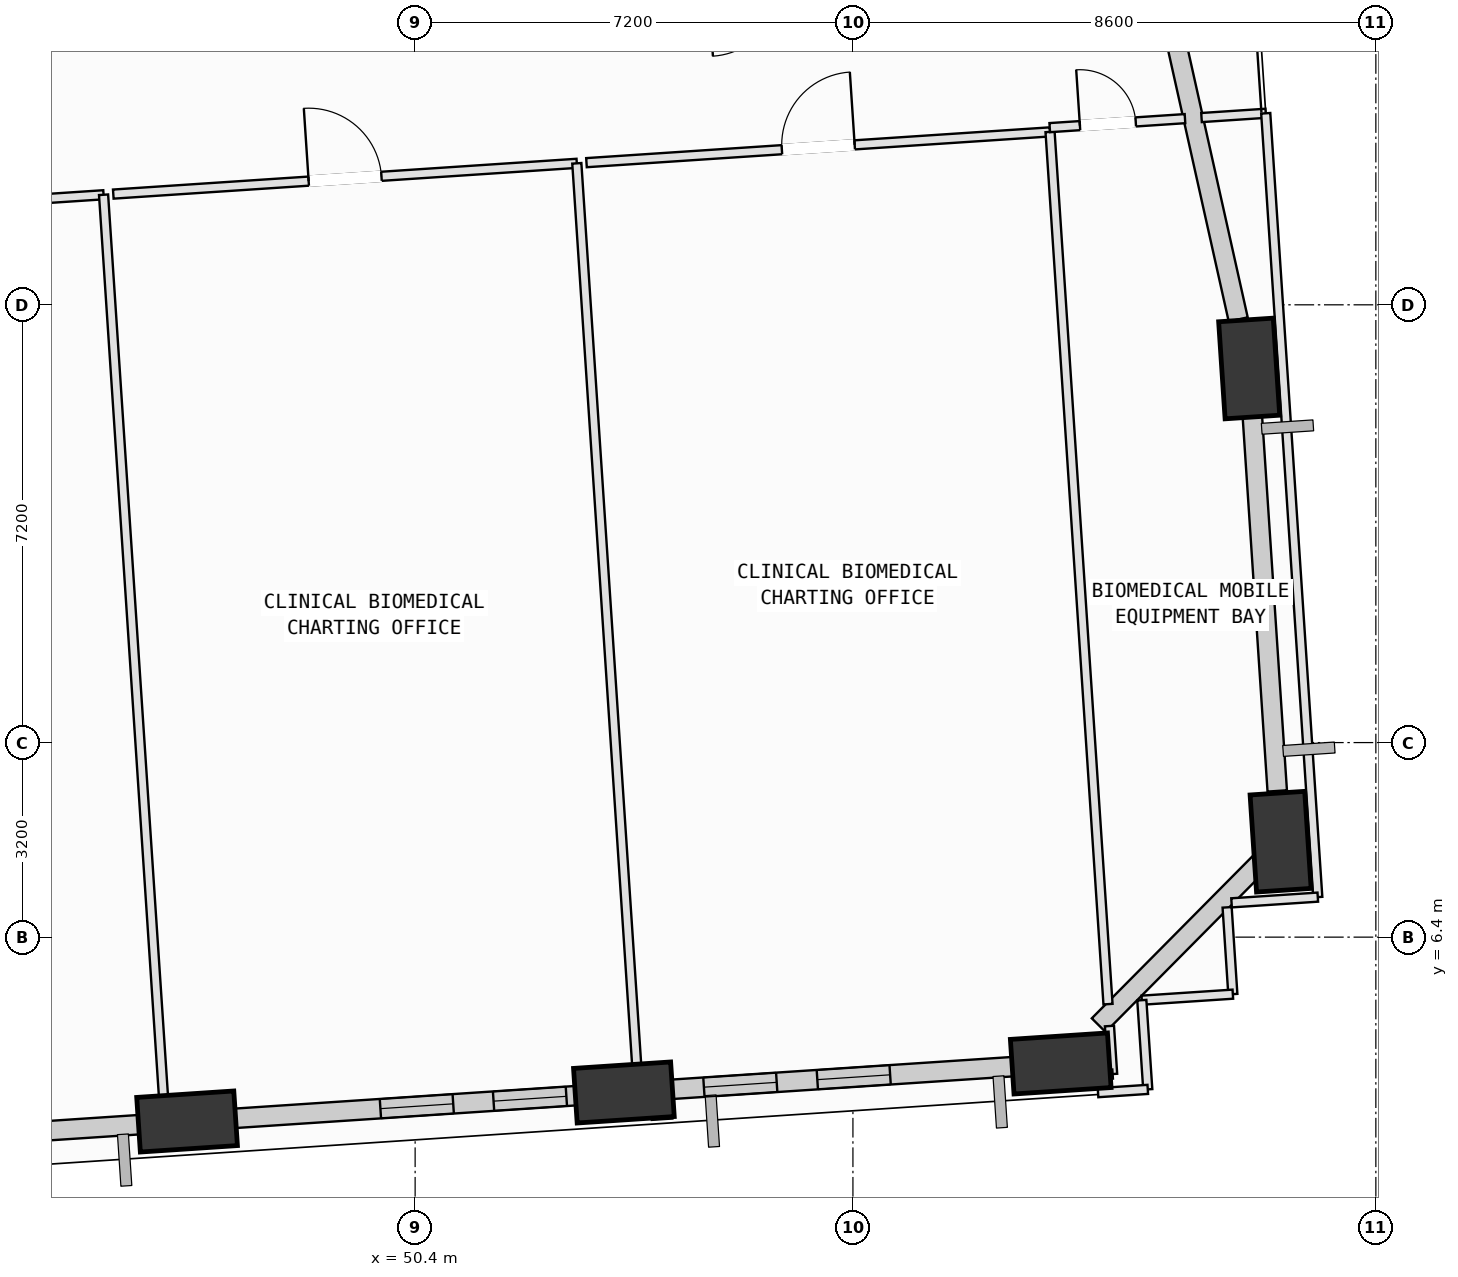
"""IFC4 building model, lengths in metres.
Left out: names, types, materials, properties, quantities, classifications, styles, units other than length and angle.
Written with IfcOpenShell. Run it as: python <this file> out.ifc"""

import sys

from ifc_helpers import new_model, si_unit, direction, frame, frame_2d, origin, origin_2d, place, context, subcontext, project, spatial, rectangle, extrude, element, fill, save


model = new_model("IFC4")
c1 = context("Model", 3, precision=1e-05, world=origin(), true_north=direction((0.0, 1.0)))
c2 = subcontext(c1, "Body", "Model", "MODEL_VIEW")
j1 = project(units=[si_unit("LENGTHUNIT", "METRE"), si_unit("PLANEANGLEUNIT", "RADIAN")], contexts=[c1])
p1 = place(None, origin())
s1 = spatial("IfcSite", under=j1, at=p1, CompositionType="ELEMENT")
p2 = place(p1, origin())
s2 = spatial("IfcBuilding", under=s1, at=p2, CompositionType="ELEMENT")
p3 = place(p2, frame((0.0, 0.0, 39.0)))
s3 = spatial("IfcBuildingStorey", under=s2, at=p3, CompositionType="ELEMENT", Elevation=39.0)
p4 = place(p3, frame((46.649, 3.368, 0.002), z_axis=(0.087918926178, 0.054561987359, 0.994632219444), x_axis=(-0.582154202885, 0.813049480392, 0.006857586938)))
e1 = element("IfcColumn", 1, at=p4, inside=s3, PredefinedType="COLUMN", context=c2, shape_type="SweptSolid", body=[
    extrude(rectangle(XDim=1.6, YDim=0.9, at=origin_2d()), origin(), (0.0, 0.0, 1.0), 4.018),
])
p5 = place(p3, frame((53.833, 3.845, 0.002), z_axis=(0.085512165831, 0.083995992678, 0.992790180607), x_axis=(-0.746152490945, 0.665727687724, 0.007943931871)))
e2 = element("IfcColumn", 2, at=p5, inside=s3, PredefinedType="COLUMN", context=c2, shape_type="SweptSolid", body=[
    extrude(rectangle(XDim=1.6, YDim=0.9, at=origin_2d()), origin(), (0.0, 0.0, 1.0), 4.026),
])
p6 = place(p3, frame((61.018, 4.322, 0.002), z_axis=(0.083102095213, 0.113222068587, 0.990088281395), x_axis=(-0.843211688946, 0.537501079101, 0.009307931615)))
e3 = element("IfcColumn", 3, at=p6, inside=s3, PredefinedType="COLUMN", context=c2, shape_type="SweptSolid", body=[
    extrude(rectangle(XDim=1.6, YDim=0.9, at=origin_2d()), origin(), (0.0, 0.0, 1.0), 4.037),
])
p7 = place(p3, frame((64.634, 7.97, 0.002), z_axis=(0.067938851582, 0.127838675352, 0.989465302843), x_axis=(-0.404799961603, -0.902923380354, 0.144451930745)))
e4 = element("IfcColumn", 4, at=p7, inside=s3, PredefinedType="COLUMN", context=c2, shape_type="SweptSolid", body=[
    extrude(rectangle(XDim=1.6, YDim=0.9, at=origin_2d()), origin(), (0.0, 0.0, 1.0), 4.039),
])
p8 = place(p3, frame((64.117, 15.753, 0.002), z_axis=(0.036155726084, 0.125727449498, 0.991405755437), x_axis=(-0.209701379311, -0.969012835214, 0.130535269967)))
e5 = element("IfcColumn", 5, at=p8, inside=s3, PredefinedType="COLUMN", context=c2, shape_type="SweptSolid", body=[
    extrude(rectangle(XDim=1.6, YDim=0.9, at=origin_2d()), origin(), (0.0, 0.0, 1.0), 4.031),
])
p9 = place(p3, frame((46.234, 3.34, 0.0), z_axis=(0.0, 0.0, 1.0), x_axis=(-0.997800992152, -0.066281068641, 0.0)))
e6 = element("IfcWall", 6, at=p9, inside=s3, PredefinedType="SOLIDWALL", context=c2, shape_type="SweptSolid", body=[
    extrude(rectangle(XDim=5.993, YDim=0.32, at=frame_2d((2.997, 0.0))), origin(), (0.0, 0.0, 1.0), 3.145),
])
p10 = place(p9, frame((2.298, 0.0, 0.75)))
e7 = element("IfcOpeningElement", 7, at=p10, cuts=e6, PredefinedType="OPENING", context=c2, shape_type="SweptSolid", body=[
    extrude(rectangle(XDim=1.4, YDim=1.85, at=frame_2d((0.7, 0.925))), frame((0.0, 0.17, 0.0), z_axis=(0.0, -1.0, 0.0), x_axis=(1.0, 0.0, 0.0)), (0.0, 0.0, 1.0), 0.34),
])
p11 = place(p3, frame((53.43, 3.818, 0.0), z_axis=(0.0, 0.0, 1.0), x_axis=(-0.997801835768, -0.066268367557, 0.0)))
e8 = element("IfcWall", 8, at=p11, inside=s3, PredefinedType="SOLIDWALL", context=c2, shape_type="SweptSolid", body=[
    extrude(rectangle(XDim=6.012, YDim=0.32, at=frame_2d((3.006, 0.0))), origin(), (0.0, 0.0, 1.0), 2.865),
])
p12 = place(p11, frame((2.409, 0.0, 0.75)))
e9 = element("IfcOpeningElement", 9, at=p12, cuts=e8, PredefinedType="OPENING", context=c2, shape_type="SweptSolid", body=[
    extrude(rectangle(XDim=1.2, YDim=1.75, at=frame_2d((0.6, 0.875))), frame((0.0, 0.17, 0.0), z_axis=(0.0, -1.0, 0.0), x_axis=(1.0, 0.0, 0.0)), (0.0, 0.0, 1.0), 0.34),
])
p13 = place(p11, frame((0.544, 0.0, 0.75)))
e10 = element("IfcOpeningElement", 10, at=p13, cuts=e8, PredefinedType="OPENING", context=c2, shape_type="SweptSolid", body=[
    extrude(rectangle(XDim=1.2, YDim=1.75, at=frame_2d((0.6, 0.875))), frame((0.0, 0.17, 0.0), z_axis=(0.0, -1.0, 0.0), x_axis=(1.0, 0.0, 0.0)), (0.0, 0.0, 1.0), 0.34),
])
p14 = place(p3, frame((60.633, 4.296, 0.0), z_axis=(0.0, 0.0, 1.0), x_axis=(-0.997803705624, -0.066240207142, 0.0)))
e11 = element("IfcWall", 11, at=p14, inside=s3, PredefinedType="SOLIDWALL", context=c2, shape_type="SweptSolid", body=[
    extrude(rectangle(XDim=6.044, YDim=0.32, at=frame_2d((3.022, 0.0))), origin(), (0.0, 0.0, 1.0), 2.865),
])
p15 = place(p14, frame((2.427, 0.0, 0.75)))
e12 = element("IfcOpeningElement", 12, at=p15, cuts=e11, PredefinedType="OPENING", context=c2, shape_type="SweptSolid", body=[
    extrude(rectangle(XDim=1.2, YDim=1.75, at=frame_2d((0.6, 0.875))), frame((0.0, 0.17, 0.0), z_axis=(0.0, -1.0, 0.0), x_axis=(1.0, 0.0, 0.0)), (0.0, 0.0, 1.0), 0.34),
])
p16 = place(p14, frame((4.296, 0.0, 0.75)))
e13 = element("IfcOpeningElement", 13, at=p16, cuts=e11, PredefinedType="OPENING", context=c2, shape_type="SweptSolid", body=[
    extrude(rectangle(XDim=1.2, YDim=1.75, at=frame_2d((0.6, 0.875))), frame((0.0, 0.17, 0.0), z_axis=(0.0, -1.0, 0.0), x_axis=(1.0, 0.0, 0.0)), (0.0, 0.0, 1.0), 0.34),
])
p17 = place(p3, frame((64.407, 7.741, 0.0), z_axis=(0.0, 0.0, 1.0), x_axis=(-0.704023171007, -0.710177002363, 0.0)))
e14 = element("IfcWall", 14, at=p17, inside=s3, PredefinedType="SOLIDWALL", context=c2, shape_type="SweptSolid", body=[
    extrude(rectangle(XDim=3.928, YDim=0.32, at=frame_2d((1.964, 0.0))), origin(), (0.0, 0.0, 1.0), 3.165),
])
p18 = place(p3, frame((64.14, 15.4, 0.0), z_axis=(0.0, 0.0, 1.0), x_axis=(0.066259164562, -0.997802446936, 0.0)))
e15 = element("IfcWall", 15, at=p18, inside=s3, PredefinedType="SOLIDWALL", context=c2, shape_type="SweptSolid", body=[
    extrude(rectangle(XDim=6.61, YDim=0.32, at=frame_2d((3.305, 0.0))), origin(), (0.0, 0.0, 1.0), 3.165),
])
p19 = place(p3, frame((62.059, 24.966, 0.0), z_axis=(0.0, 0.0, 1.0), x_axis=(0.217983679512, -0.97595241455, 0.0)))
e16 = element("IfcWall", 16, at=p19, inside=s3, PredefinedType="SOLIDWALL", context=c2, shape_type="SweptSolid", body=[
    extrude(rectangle(XDim=8.614, YDim=0.32, at=frame_2d((4.307, 0.0))), origin(), (0.0, 0.0, 1.0), 3.165),
])
p20 = place(p3, frame((38.03, 18.129, 0.0), z_axis=(0.0, 0.0, 1.0), x_axis=(0.997802084091, 0.066264628449, 0.0)))
e17 = element("IfcWall", 17, at=p20, inside=s3, PredefinedType="PARTITIONING", context=c2, shape_type="SweptSolid", body=[
    extrude(rectangle(XDim=7.262, YDim=0.15, at=frame_2d((3.631, 0.0))), origin(), (0.0, 0.0, 1.0), 3.78),
])
p21 = place(p20, frame((3.031, 0.0, 0.0)))
e18 = element("IfcOpeningElement", 18, at=p21, cuts=e17, PredefinedType="OPENING", context=c2, shape_type="SweptSolid", body=[
    extrude(rectangle(XDim=1.2, YDim=2.15, at=frame_2d((0.6, 1.075))), frame((0.0, 0.085, 0.0), z_axis=(0.0, -1.0, 0.0), x_axis=(1.0, 0.0, 0.0)), (0.0, 0.0, 1.0), 0.17),
])
p22 = place(p3, frame((45.276, 18.61, 0.0), z_axis=(0.0, 0.0, 1.0), x_axis=(0.066289466221, -0.997800434289, 0.0)))
e19 = element("IfcWall", 19, at=p22, inside=s3, PredefinedType="PARTITIONING", context=c2, shape_type="SweptSolid", body=[
    extrude(rectangle(XDim=15.177, YDim=0.15, at=frame_2d((7.589, 0.0))), origin(), (0.0, 0.0, 1.0), 3.78),
])
p23 = place(p3, frame((45.436, 18.621, 0.0), z_axis=(0.0, 0.0, 1.0), x_axis=(0.997805472688, 0.066213583763, 0.0)))
e20 = element("IfcWall", 20, at=p23, inside=s3, PredefinedType="PARTITIONING", context=c2, shape_type="SweptSolid", body=[
    extrude(rectangle(XDim=7.64, YDim=0.15, at=frame_2d((3.82, 0.0))), origin(), (0.0, 0.0, 1.0), 3.78),
])
p24 = place(p23, frame((3.22, 0.0, 0.0)))
e21 = element("IfcOpeningElement", 21, at=p24, cuts=e20, PredefinedType="OPENING", context=c2, shape_type="SweptSolid", body=[
    extrude(rectangle(XDim=1.2, YDim=2.15, at=frame_2d((0.6, 1.075))), frame((0.0, 0.085, 0.0), z_axis=(0.0, -1.0, 0.0), x_axis=(1.0, 0.0, 0.0)), (0.0, 0.0, 1.0), 0.17),
])
p25 = place(p3, frame((53.059, 19.127, 0.0), z_axis=(0.0, 0.0, 1.0), x_axis=(0.06624667966, -0.997803275919, 0.0)))
e22 = element("IfcWall", 22, at=p25, inside=s3, PredefinedType="PARTITIONING", context=c2, shape_type="SweptSolid", body=[
    extrude(rectangle(XDim=15.53, YDim=0.15, at=frame_2d((7.765, 0.0))), origin(), (0.0, 0.0, 1.0), 3.78),
])
p26 = place(p3, frame((54.088, 3.631, 0.0), z_axis=(0.0, 0.0, 1.0), x_axis=(-0.997748116505, -0.067072319264, 0.0)))
e23 = element("IfcWall", 23, at=p26, inside=s3, PredefinedType="PARTITIONING", context=c2, shape_type="SweptSolid", body=[
    extrude(rectangle(XDim=0.644, YDim=0.15, at=frame_2d((0.322, 0.0))), origin(), (0.0, 0.0, 1.0), 3.78),
])
p27 = place(p3, frame((47.446, 3.19, 0.0), z_axis=(0.0, 0.0, 1.0), x_axis=(-0.997815818471, -0.066057493209, 0.0)))
e24 = element("IfcWall", 24, at=p27, inside=s3, PredefinedType="PARTITIONING", context=c2, shape_type="SweptSolid", body=[
    extrude(rectangle(XDim=0.983, YDim=0.15, at=frame_2d((0.492, 0.0))), origin(), (0.0, 0.0, 1.0), 3.145),
])
p28 = place(p3, frame((53.218, 19.138, 0.0), z_axis=(0.0, 0.0, 1.0), x_axis=(0.99780392173, 0.066236951766, 0.0)))
e25 = element("IfcWall", 25, at=p28, inside=s3, PredefinedType="PARTITIONING", context=c2, shape_type="SweptSolid", body=[
    extrude(rectangle(XDim=7.641, YDim=0.15, at=frame_2d((3.82, 0.0))), origin(), (0.0, 0.0, 1.0), 3.78),
])
p29 = place(p28, frame((3.22, 0.0, 0.0)))
e26 = element("IfcOpeningElement", 26, at=p29, cuts=e25, PredefinedType="OPENING", context=c2, shape_type="SweptSolid", body=[
    extrude(rectangle(XDim=1.2, YDim=2.15, at=frame_2d((0.6, 1.075))), frame((0.0, 0.085, 0.0), z_axis=(0.0, -1.0, 0.0), x_axis=(1.0, 0.0, 0.0)), (0.0, 0.0, 1.0), 0.17),
])
p30 = place(p3, frame((60.842, 19.644, 0.0), z_axis=(0.0, 0.0, 1.0), x_axis=(0.0662755688, -0.997801357476, 0.0)))
e27 = element("IfcWall", 27, at=p30, inside=s3, PredefinedType="PARTITIONING", context=c2, shape_type="SweptSolid", body=[
    extrude(rectangle(XDim=14.377, YDim=0.15, at=frame_2d((7.189, 0.0))), origin(), (0.0, 0.0, 1.0), 3.78),
])
p31 = place(p3, frame((61.819, 4.938, 0.0), z_axis=(0.0, 0.0, 1.0), x_axis=(0.065679876034, -0.997840745753, 0.0)))
e28 = element("IfcWall", 28, at=p31, inside=s3, PredefinedType="PARTITIONING", context=c2, shape_type="SweptSolid", body=[
    extrude(rectangle(XDim=0.792, YDim=0.15, at=frame_2d((0.396, 0.0))), origin(), (0.0, 0.0, 1.0), 3.78),
])
p32 = place(p3, frame((61.871, 4.148, 0.0), z_axis=(0.0, 0.0, 1.0), x_axis=(-0.997811516746, -0.066122439832, 0.0)))
e29 = element("IfcWall", 29, at=p32, inside=s3, PredefinedType="PARTITIONING", context=c2, shape_type="SweptSolid", body=[
    extrude(rectangle(XDim=1.226, YDim=0.15, at=frame_2d((0.613, 0.0))), origin(), (0.0, 0.0, 1.0), 3.78),
])
p33 = place(p3, frame((49.057, 21.678, 0.0), z_axis=(0.0, 0.0, 1.0), x_axis=(-0.99779880156, -0.066314037763, 0.0)))
e30 = element("IfcWall", 30, at=p33, inside=s3, PredefinedType="PARTITIONING", context=c2, shape_type="SweptSolid", body=[
    extrude(rectangle(XDim=14.704, YDim=0.15, at=frame_2d((7.352, 0.0))), origin(), (0.0, 0.0, 1.0), 3.78),
])
p34 = place(p33, frame((6.752, 0.0, 0.0)))
e31 = element("IfcOpeningElement", 31, at=p34, cuts=e30, PredefinedType="OPENING", context=c2, shape_type="SweptSolid", body=[
    extrude(rectangle(XDim=1.2, YDim=2.15, at=frame_2d((0.6, 1.075))), frame((0.0, 0.085, 0.0), z_axis=(0.0, -1.0, 0.0), x_axis=(1.0, 0.0, 0.0)), (0.0, 0.0, 1.0), 0.17),
])
p35 = place(p3, frame((63.754, 6.89, 0.0), z_axis=(0.0, 0.0, 1.0), x_axis=(0.065681083351, -0.997840666284, 0.0)))
e32 = element("IfcWall", 32, at=p35, inside=s3, PredefinedType="PARTITIONING", context=c2, shape_type="SweptSolid", body=[
    extrude(rectangle(XDim=1.431, YDim=0.15, at=frame_2d((0.716, 0.0))), origin(), (0.0, 0.0, 1.0), 3.78),
])
p36 = place(p3, frame((63.848, 5.462, 0.0), z_axis=(0.0, 0.0, 1.0), x_axis=(-0.997825302127, -0.065914083732, 0.0)))
e33 = element("IfcWall", 33, at=p36, inside=s3, PredefinedType="PARTITIONING", context=c2, shape_type="SweptSolid", body=[
    extrude(rectangle(XDim=1.5, YDim=0.15, at=frame_2d((0.75, 0.0))), origin(), (0.0, 0.0, 1.0), 3.78),
])
p37 = place(p3, frame((62.351, 5.363, 0.0), z_axis=(0.0, 0.0, 1.0), x_axis=(0.066585135576, -0.997780747319, 0.0)))
e34 = element("IfcWall", 34, at=p37, inside=s3, PredefinedType="PARTITIONING", context=c2, shape_type="SweptSolid", body=[
    extrude(rectangle(XDim=1.47, YDim=0.15, at=frame_2d((0.735, 0.0))), origin(), (0.0, 0.0, 1.0), 3.78),
])
p38 = place(p3, frame((62.449, 3.896, 0.0), z_axis=(0.0, 0.0, 1.0), x_axis=(-0.997831046704, -0.065827063081, 0.0)))
e35 = element("IfcWall", 35, at=p38, inside=s3, PredefinedType="PARTITIONING", context=c2, shape_type="SweptSolid", body=[
    extrude(rectangle(XDim=0.82, YDim=0.15, at=frame_2d((0.41, 0.0))), origin(), (0.0, 0.0, 1.0), 3.78),
])
p39 = place(p3, frame((60.837, 19.714, 0.0), z_axis=(0.0, 0.0, 1.0), x_axis=(0.997794839956, 0.066373619431, 0.0)))
e36 = element("IfcWall", 36, at=p39, inside=s3, PredefinedType="PARTITIONING", context=c2, shape_type="SweptSolid", body=[
    extrude(rectangle(XDim=2.229, YDim=0.15, at=frame_2d((1.115, 0.0))), origin(), (0.0, 0.0, 1.0), 3.78),
])
p40 = place(p39, frame((0.497, 0.0, 0.0)))
e37 = element("IfcOpeningElement", 37, at=p40, cuts=e36, PredefinedType="OPENING", context=c2, shape_type="SweptSolid", body=[
    extrude(rectangle(XDim=0.92, YDim=2.1, at=frame_2d((0.46, 1.05))), frame((0.0, 0.085, 0.0), z_axis=(0.0, -1.0, 0.0), x_axis=(1.0, 0.0, 0.0)), (0.0, 0.0, 1.0), 0.17),
])
p41 = place(p3, frame((63.333, 19.88, 0.0), z_axis=(0.0, 0.0, 1.0), x_axis=(0.997805527361, 0.06621275985, 0.0)))
e38 = element("IfcWall", 38, at=p41, inside=s3, PredefinedType="PARTITIONING", context=c2, shape_type="SweptSolid", body=[
    extrude(rectangle(XDim=1.058, YDim=0.15, at=frame_2d((0.529, 0.0))), origin(), (0.0, 0.0, 1.0), 3.78),
])
p42 = place(p3, frame((64.389, 19.95, 0.0), z_axis=(0.0, 0.0, 1.0), x_axis=(0.066268176923, -0.997801848428, 0.0)))
e39 = element("IfcWall", 39, at=p42, inside=s3, PredefinedType="PARTITIONING", context=c2, shape_type="SweptSolid", body=[
    extrude(rectangle(XDim=12.92, YDim=0.15, at=frame_2d((6.46, 0.0))), origin(), (0.0, 0.0, 1.0), 3.165),
])
p43 = place(p3, frame((65.245, 7.058, 0.0), z_axis=(0.0, 0.0, 1.0), x_axis=(-0.997810924043, -0.066131383329, 0.0)))
e40 = element("IfcWall", 40, at=p43, inside=s3, PredefinedType="PARTITIONING", context=c2, shape_type="SweptSolid", body=[
    extrude(rectangle(XDim=1.421, YDim=0.15, at=frame_2d((0.711, 0.0))), origin(), (0.0, 0.0, 1.0), 3.78),
])
p44 = place(p12, origin())
e41 = element("IfcWindow", 41, at=p44, inside=s3, PartitioningType="SINGLE_PANEL", PredefinedType="WINDOW", context=c2, shape_type="SweptSolid", body=[
    extrude(rectangle(XDim=1.2, YDim=1.75, at=frame_2d((0.6, 0.875))), frame((0.0, 0.03, 0.0), z_axis=(0.0, -1.0, 0.0), x_axis=(1.0, 0.0, 0.0)), (0.0, 0.0, 1.0), 0.06),
])
fill(e9, e41)
p45 = place(p13, origin())
e42 = element("IfcWindow", 42, at=p45, inside=s3, PartitioningType="SINGLE_PANEL", PredefinedType="WINDOW", context=c2, shape_type="SweptSolid", body=[
    extrude(rectangle(XDim=1.2, YDim=1.75, at=frame_2d((0.6, 0.875))), frame((0.0, 0.03, 0.0), z_axis=(0.0, -1.0, 0.0), x_axis=(1.0, 0.0, 0.0)), (0.0, 0.0, 1.0), 0.06),
])
fill(e10, e42)
p46 = place(p15, origin())
e43 = element("IfcWindow", 43, at=p46, inside=s3, PartitioningType="SINGLE_PANEL", PredefinedType="WINDOW", context=c2, shape_type="SweptSolid", body=[
    extrude(rectangle(XDim=1.2, YDim=1.75, at=frame_2d((0.6, 0.875))), frame((0.0, 0.03, 0.0), z_axis=(0.0, -1.0, 0.0), x_axis=(1.0, 0.0, 0.0)), (0.0, 0.0, 1.0), 0.06),
])
fill(e12, e43)
p47 = place(p16, origin())
e44 = element("IfcWindow", 44, at=p47, inside=s3, PartitioningType="SINGLE_PANEL", PredefinedType="WINDOW", context=c2, shape_type="SweptSolid", body=[
    extrude(rectangle(XDim=1.2, YDim=1.75, at=frame_2d((0.6, 0.875))), frame((0.0, 0.03, 0.0), z_axis=(0.0, -1.0, 0.0), x_axis=(1.0, 0.0, 0.0)), (0.0, 0.0, 1.0), 0.06),
])
fill(e13, e44)
p48 = place(p24, origin())
e45 = element("IfcDoor", 45, at=p48, inside=s3, OperationType="SINGLE_SWING_LEFT", PredefinedType="DOOR", context=c2, shape_type="SweptSolid", body=[
    extrude(rectangle(XDim=1.2, YDim=2.15, at=frame_2d((0.6, 1.075))), frame((0.0, 0.025, 0.0), z_axis=(0.0, -1.0, 0.0), x_axis=(1.0, 0.0, 0.0)), (0.0, 0.0, 1.0), 0.05),
])
fill(e21, e45)
p49 = place(p29, origin())
e46 = element("IfcDoor", 46, at=p49, inside=s3, OperationType="SINGLE_SWING_RIGHT", PredefinedType="DOOR", context=c2, shape_type="SweptSolid", body=[
    extrude(rectangle(XDim=1.2, YDim=2.15, at=frame_2d((0.6, 1.075))), frame((0.0, 0.025, 0.0), z_axis=(0.0, -1.0, 0.0), x_axis=(1.0, 0.0, 0.0)), (0.0, 0.0, 1.0), 0.05),
])
fill(e26, e46)
p50 = place(p40, origin())
e47 = element("IfcDoor", 47, at=p50, inside=s3, OperationType="SINGLE_SWING_LEFT", PredefinedType="DOOR", context=c2, shape_type="SweptSolid", body=[
    extrude(rectangle(XDim=0.92, YDim=2.1, at=frame_2d((0.46, 1.05))), frame((0.0, 0.025, 0.0), z_axis=(0.0, -1.0, 0.0), x_axis=(1.0, 0.0, 0.0)), (0.0, 0.0, 1.0), 0.05),
])
fill(e37, e47)
save(model, sys.argv[1])
